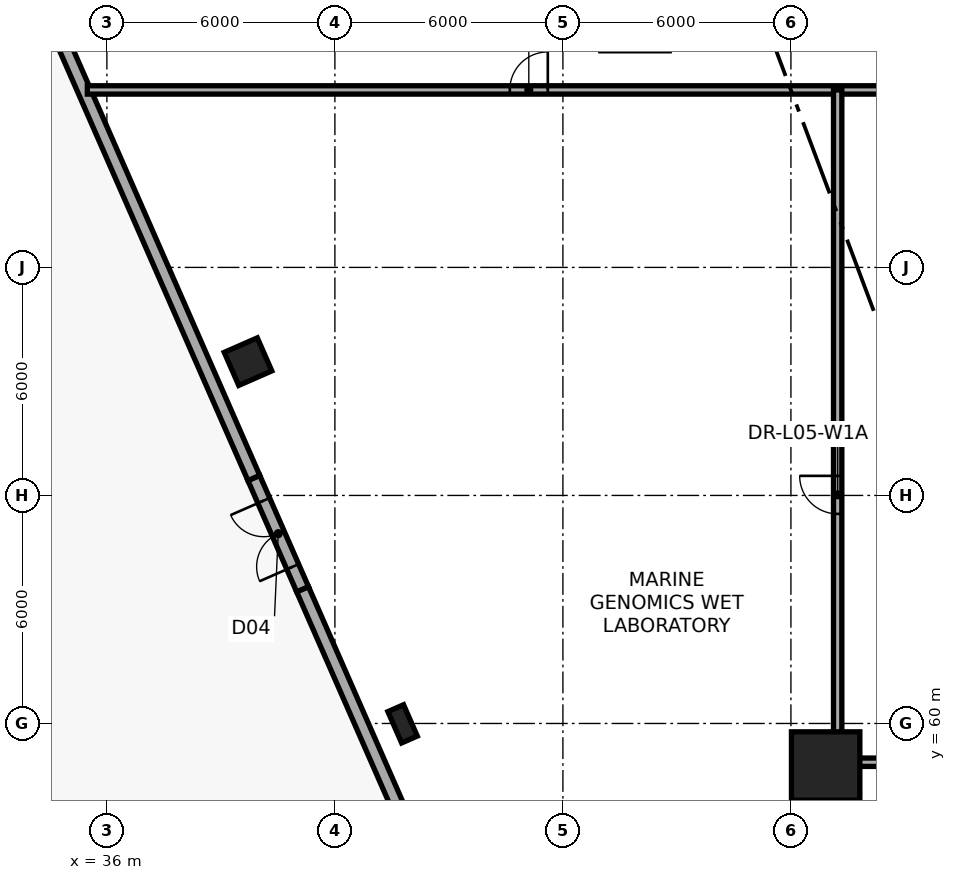
"""IFC4 building model, lengths in metres.
Left out: names, types, materials, properties, quantities, classifications, styles, units other than length and angle.
Written with IfcOpenShell. Run it as: python <this file> out.ifc"""

import sys

from ifc_helpers import new_model, si_unit, direction, frame, frame_2d, origin, origin_2d, place, context, subcontext, project, spatial, rectangle, extrude, element, fill, save


model = new_model("IFC4")
c1 = context("Model", 3, precision=1e-05, world=origin(), true_north=direction((0.0, 1.0)))
c2 = subcontext(c1, "Body", "Model", "MODEL_VIEW")
j1 = project(units=[si_unit("LENGTHUNIT", "METRE"), si_unit("PLANEANGLEUNIT", "RADIAN")], contexts=[c1])
p1 = place(None, origin())
s1 = spatial("IfcSite", under=j1, at=p1, CompositionType="ELEMENT")
p2 = place(p1, origin())
s2 = spatial("IfcBuilding", under=s1, at=p2, CompositionType="ELEMENT")
p3 = place(p2, frame((0.0, 0.0, 22.8)))
s3 = spatial("IfcBuildingStorey", under=s2, at=p3, CompositionType="ELEMENT", Elevation=22.8)
p4 = place(p3, frame((54.914, 58.88, 0.0), z_axis=(0.0, 0.0, 1.0), x_axis=(1.0, 0.0, 0.0)))
e1 = element("IfcColumn", 1, at=p4, inside=s3, PredefinedType="COLUMN", context=c2, shape_type="SweptSolid", body=[
    extrude(rectangle(XDim=1.8, YDim=1.8, at=origin_2d()), origin(), (0.0, 0.0, 1.0), 3.65),
])
p5 = place(p3, frame((39.643, 69.531, 0.003), z_axis=(0.039296319589, -0.005757212069, 0.99921101564), x_axis=(0.963703994598, 0.264483260231, -0.036376034065)))
e2 = element("IfcColumn", 2, at=p5, inside=s3, PredefinedType="COLUMN", context=c2, shape_type="SweptSolid", body=[
    extrude(rectangle(XDim=0.95, YDim=0.95, at=origin_2d()), origin(), (0.0, 0.0, 1.0), 3.647),
])
p6 = place(p3, frame((43.723, 59.971, 0.003), z_axis=(0.032073367297, 0.010512565064, 0.999430230224), x_axis=(0.744835901835, 0.6665311743, -0.030913961634)))
e3 = element("IfcColumn", 3, at=p6, inside=s3, PredefinedType="PILASTER", context=c2, shape_type="SweptSolid", body=[
    extrude(rectangle(XDim=0.9, YDim=0.45, at=origin_2d()), origin(), (0.0, 0.0, 1.0), 3.646),
])
p7 = place(p3, frame((41.151, 63.529, 0.0), z_axis=(0.0, 0.0, 1.0), x_axis=(-0.401383083928, 0.915910268496, 0.0)))
e4 = element("IfcWall", 4, at=p7, inside=s3, PredefinedType="STANDARD", context=c2, shape_type="SweptSolid", body=[
    extrude(rectangle(XDim=3.2, YDim=0.34, at=frame_2d((1.6, 0.0))), origin(), (0.0, 0.0, 1.0), 3.375),
])
p8 = place(p7, frame((0.65, 0.0, 0.0)))
e5 = element("IfcOpeningElement", 5, at=p8, cuts=e4, PredefinedType="OPENING", context=c2, shape_type="SweptSolid", body=[
    extrude(rectangle(XDim=1.9, YDim=2.3, at=frame_2d((0.95, 1.15))), frame((0.0, 0.18, 0.0), z_axis=(0.0, -1.0, 0.0), x_axis=(1.0, 0.0, 0.0)), (0.0, 0.0, 1.0), 0.36),
])
p9 = place(p3, frame((61.237, 17.689, 0.0), z_axis=(0.0, 0.0, 1.0), x_axis=(-0.401346447851, 0.9159263228, 0.0)))
e6 = element("IfcWall", 6, at=p9, inside=s3, PredefinedType="STANDARD", context=c2, shape_type="SweptSolid", body=[
    extrude(rectangle(XDim=50.047, YDim=0.34, at=frame_2d((25.023, 0.0))), origin(), (0.0, 0.0, 1.0), 0.85),
])
p10 = place(p3, frame((39.867, 66.46, 0.0), z_axis=(0.0, 0.0, 1.0), x_axis=(-0.401345184565, 0.915926876353, 0.0)))
e7 = element("IfcWall", 7, at=p10, inside=s3, PredefinedType="STANDARD", context=c2, shape_type="SweptSolid", body=[
    extrude(rectangle(XDim=20.534, YDim=0.34, at=frame_2d((10.267, 0.0))), origin(), (0.0, 0.0, 1.0), 0.85),
])
p11 = place(p3, frame((35.486, 76.67, 0.0), z_axis=(0.0, 0.0, 1.0), x_axis=(1.0, 0.0, 0.0)))
e8 = element("IfcWall", 8, at=p11, inside=s3, PredefinedType="PARTITIONING", context=c2, shape_type="SweptSolid", body=[
    extrude(rectangle(XDim=61.029, YDim=0.22, at=frame_2d((30.514, 0.0))), origin(), (0.0, 0.0, 1.0), 2.505),
])
p12 = place(p11, frame((24.074, 0.0, 0.0)))
e9 = element("IfcOpeningElement", 9, at=p12, cuts=e8, PredefinedType="OPENING", context=c2, shape_type="SweptSolid", body=[
    extrude(rectangle(XDim=0.98, YDim=2.1, at=frame_2d((0.49, 1.05))), frame((0.0, 0.12, 0.0), z_axis=(0.0, -1.0, 0.0), x_axis=(1.0, 0.0, 0.0)), (0.0, 0.0, 1.0), 0.24),
])
p13 = place(p11, frame((26.899, 0.0, 0.0)))
e10 = element("IfcOpeningElement", 10, at=p13, cuts=e8, PredefinedType="OPENING", context=c2, shape_type="SweptSolid", body=[
    extrude(rectangle(XDim=0.98, YDim=2.1, at=frame_2d((0.49, 1.05))), frame((0.0, 0.12, 0.0), z_axis=(0.0, -1.0, 0.0), x_axis=(1.0, 0.0, 0.0)), (0.0, 0.0, 1.0), 0.24),
])
p14 = place(p11, frame((11.117, 0.0, 0.0)))
e11 = element("IfcOpeningElement", 11, at=p14, cuts=e8, PredefinedType="OPENING", context=c2, shape_type="SweptSolid", body=[
    extrude(rectangle(XDim=1.0, YDim=2.1, at=frame_2d((0.5, 1.05))), frame((0.0, 0.12, 0.0), z_axis=(0.0, -1.0, 0.0), x_axis=(1.0, 0.0, 0.0)), (0.0, 0.0, 1.0), 0.24),
])
p15 = place(p11, frame((41.783, 0.0, 0.0)))
e12 = element("IfcOpeningElement", 12, at=p15, cuts=e8, PredefinedType="OPENING", context=c2, shape_type="SweptSolid", body=[
    extrude(rectangle(XDim=1.0, YDim=2.1, at=frame_2d((0.5, 1.05))), frame((0.0, 0.12, 0.0), z_axis=(0.0, -1.0, 0.0), x_axis=(1.0, 0.0, 0.0)), (0.0, 0.0, 1.0), 0.24),
])
p16 = place(p3, frame((55.23, 58.98, 0.0), z_axis=(0.0, 0.0, 1.0), x_axis=(1.0, 0.0, 0.0)))
e13 = element("IfcWall", 13, at=p16, inside=s3, PredefinedType="PARTITIONING", context=c2, shape_type="SweptSolid", body=[
    extrude(rectangle(XDim=33.533, YDim=0.22, at=frame_2d((16.767, 0.0))), origin(), (0.0, 0.0, 1.0), 2.505),
])
p17 = place(p16, frame((11.0, 0.0, 0.0)))
e14 = element("IfcOpeningElement", 14, at=p17, cuts=e13, PredefinedType="OPENING", context=c2, shape_type="SweptSolid", body=[
    extrude(rectangle(XDim=1.5, YDim=2.2, at=frame_2d((0.75, 1.1))), frame((0.0, 0.12, 0.0), z_axis=(0.0, -1.0, 0.0), x_axis=(1.0, 0.0, 0.0)), (0.0, 0.0, 1.0), 0.24),
])
p18 = place(p3, frame((55.23, 55.36, 0.0), z_axis=(0.0, 0.0, 1.0), x_axis=(0.0, 1.0, 0.0)))
e15 = element("IfcWall", 15, at=p18, inside=s3, PredefinedType="PARTITIONING", context=c2, shape_type="SweptSolid", body=[
    extrude(rectangle(XDim=21.31, YDim=0.22, at=frame_2d((10.655, 0.0))), origin(), (0.0, 0.0, 1.0), 2.555),
])
p19 = place(p18, frame((10.155, 0.0, 0.0)))
e16 = element("IfcOpeningElement", 16, at=p19, cuts=e15, PredefinedType="OPENING", context=c2, shape_type="SweptSolid", body=[
    extrude(rectangle(XDim=1.0, YDim=2.1, at=frame_2d((0.5, 1.05))), frame((0.0, 0.12, 0.0), z_axis=(0.0, -1.0, 0.0), x_axis=(1.0, 0.0, 0.0)), (0.0, 0.0, 1.0), 0.24),
])
p20 = place(p8, origin())
e17 = element("IfcDoor", 17, at=p20, inside=s3, OperationType="DOUBLE_DOOR_SINGLE_SWING", PredefinedType="DOOR", context=c2, shape_type="SweptSolid", body=[
    extrude(rectangle(XDim=1.9, YDim=2.3, at=frame_2d((0.95, 1.15))), frame((0.0, 0.025, 0.0), z_axis=(0.0, -1.0, 0.0), x_axis=(1.0, 0.0, 0.0)), (0.0, 0.0, 1.0), 0.05),
])
fill(e5, e17)
p21 = place(p14, origin())
e18 = element("IfcDoor", 18, at=p21, inside=s3, OperationType="SINGLE_SWING_RIGHT", PredefinedType="DOOR", context=c2, shape_type="SweptSolid", body=[
    extrude(rectangle(XDim=1.0, YDim=2.1, at=frame_2d((0.5, 1.05))), frame((0.0, 0.025, 0.0), z_axis=(0.0, -1.0, 0.0), x_axis=(1.0, 0.0, 0.0)), (0.0, 0.0, 1.0), 0.05),
])
fill(e11, e18)
p22 = place(p19, origin())
e19 = element("IfcDoor", 19, at=p22, inside=s3, OperationType="SINGLE_SWING_RIGHT", PredefinedType="DOOR", context=c2, shape_type="SweptSolid", body=[
    extrude(rectangle(XDim=1.0, YDim=2.1, at=frame_2d((0.5, 1.05))), frame((0.0, 0.025, 0.0), z_axis=(0.0, -1.0, 0.0), x_axis=(1.0, 0.0, 0.0)), (0.0, 0.0, 1.0), 0.05),
])
fill(e16, e19)
save(model, sys.argv[1])
